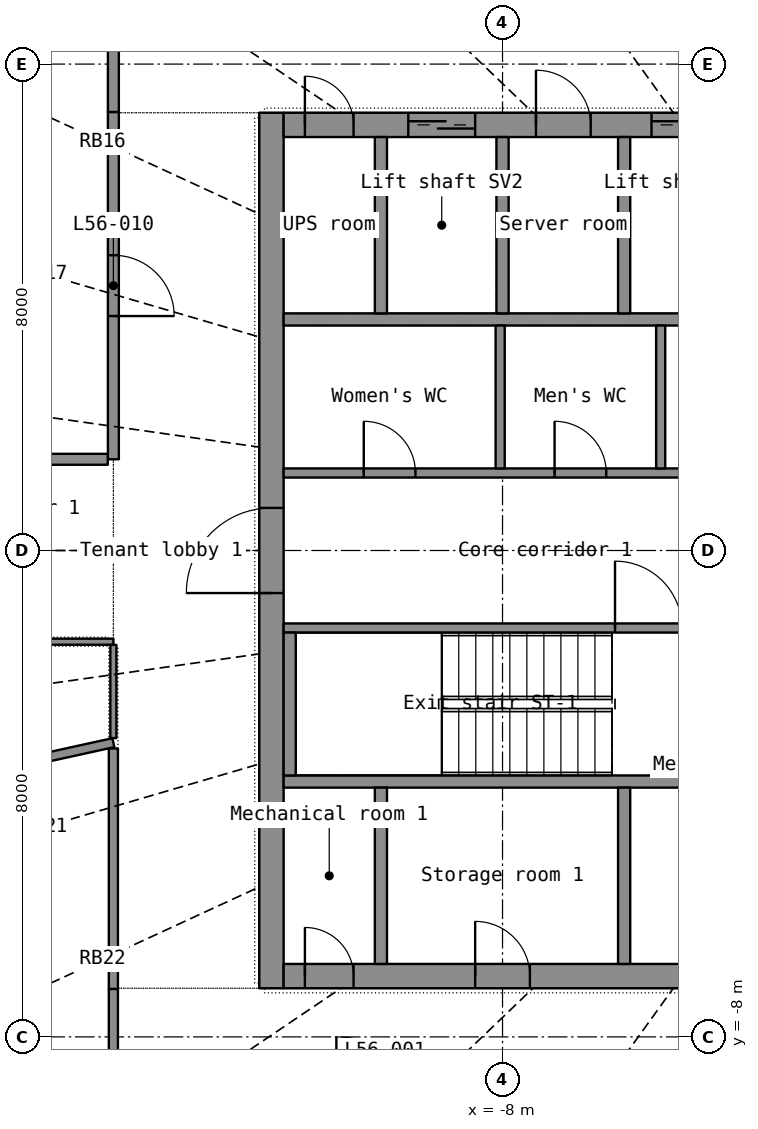
"""IFC4 building model, lengths in metres.
Left out: names, types, materials, properties, quantities, classifications, styles, units other than length and angle.
Written with IfcOpenShell. Run it as: python <this file> out.ifc"""

import sys

from ifc_helpers import new_model, si_unit, direction, frame, frame_2d, origin, place, context, subcontext, project, spatial, rectangle, extrude, element, fill, save


model = new_model("IFC4")
c1 = context("Model", 3, precision=1e-05, world=origin(), true_north=direction((0.0, 1.0)))
c2 = subcontext(c1, "Body", "Model", "MODEL_VIEW")
j1 = project(units=[si_unit("LENGTHUNIT", "METRE"), si_unit("PLANEANGLEUNIT", "RADIAN")], contexts=[c1])
p1 = place(None, origin())
s1 = spatial("IfcSite", under=j1, at=p1, CompositionType="ELEMENT")
p2 = place(p1, origin())
s2 = spatial("IfcBuilding", under=s1, at=p2, CompositionType="ELEMENT")
p3 = place(p2, frame((0.0, 0.0, 231.9)))
s3 = spatial("IfcBuildingStorey", under=s2, at=p3, CompositionType="ELEMENT", Elevation=231.9)
p4 = place(p3, frame((-11.8, -7.2, 0.0), z_axis=(0.0, 0.0, 1.0), x_axis=(0.0, 1.0, 0.0)))
e1 = element("IfcWall", 1, at=p4, inside=s3, PredefinedType="SHEAR", context=c2, shape_type="SweptSolid", body=[
    extrude(rectangle(XDim=14.4, YDim=0.4, at=frame_2d((7.2, 0.0))), origin(), (0.0, 0.0, 1.0), 3.3),
])
p5 = place(p4, frame((6.5, 0.0, 0.0)))
e2 = element("IfcOpeningElement", 2, at=p5, cuts=e1, PredefinedType="OPENING", context=c2, shape_type="SweptSolid", body=[
    extrude(rectangle(XDim=1.4, YDim=2.2, at=frame_2d((0.7, 1.1))), frame((0.0, 0.21, 0.0), z_axis=(0.0, -1.0, 0.0), x_axis=(1.0, 0.0, 0.0)), (0.0, 0.0, 1.0), 0.42),
])
p6 = place(p3, frame((-11.6, -7.0, 0.0), z_axis=(0.0, 0.0, 1.0), x_axis=(1.0, 0.0, 0.0)))
e3 = element("IfcWall", 3, at=p6, inside=s3, PredefinedType="SHEAR", context=c2, shape_type="SweptSolid", body=[
    extrude(rectangle(XDim=23.2, YDim=0.4, at=frame_2d((11.6, 0.0))), origin(), (0.0, 0.0, 1.0), 3.3),
])
p7 = place(p6, frame((20.05, 0.0, 0.0)))
e4 = element("IfcOpeningElement", 4, at=p7, cuts=e3, PredefinedType="OPENING", context=c2, shape_type="SweptSolid", body=[
    extrude(rectangle(XDim=1.1, YDim=2.2, at=frame_2d((0.55, 1.1))), frame((0.0, 0.21, 0.0), z_axis=(0.0, -1.0, 0.0), x_axis=(1.0, 0.0, 0.0)), (0.0, 0.0, 1.0), 0.42),
])
p8 = place(p6, frame((3.15, 0.0, 0.0)))
e5 = element("IfcOpeningElement", 5, at=p8, cuts=e3, PredefinedType="OPENING", context=c2, shape_type="SweptSolid", body=[
    extrude(rectangle(XDim=0.9, YDim=2.1, at=frame_2d((0.45, 1.05))), frame((0.0, 0.21, 0.0), z_axis=(0.0, -1.0, 0.0), x_axis=(1.0, 0.0, 0.0)), (0.0, 0.0, 1.0), 0.42),
])
p9 = place(p6, frame((7.15, 0.0, 0.0)))
e6 = element("IfcOpeningElement", 6, at=p9, cuts=e3, PredefinedType="OPENING", context=c2, shape_type="SweptSolid", body=[
    extrude(rectangle(XDim=0.9, YDim=2.1, at=frame_2d((0.45, 1.05))), frame((0.0, 0.21, 0.0), z_axis=(0.0, -1.0, 0.0), x_axis=(1.0, 0.0, 0.0)), (0.0, 0.0, 1.0), 0.42),
])
p10 = place(p6, frame((11.15, 0.0, 0.0)))
e7 = element("IfcOpeningElement", 7, at=p10, cuts=e3, PredefinedType="OPENING", context=c2, shape_type="SweptSolid", body=[
    extrude(rectangle(XDim=0.9, YDim=2.1, at=frame_2d((0.45, 1.05))), frame((0.0, 0.21, 0.0), z_axis=(0.0, -1.0, 0.0), x_axis=(1.0, 0.0, 0.0)), (0.0, 0.0, 1.0), 0.42),
])
p11 = place(p6, frame((16.15, 0.0, 0.0)))
e8 = element("IfcOpeningElement", 8, at=p11, cuts=e3, PredefinedType="OPENING", context=c2, shape_type="SweptSolid", body=[
    extrude(rectangle(XDim=0.9, YDim=2.1, at=frame_2d((0.45, 1.05))), frame((0.0, 0.21, 0.0), z_axis=(0.0, -1.0, 0.0), x_axis=(1.0, 0.0, 0.0)), (0.0, 0.0, 1.0), 0.42),
])
p12 = place(p6, frame((0.35, 0.0, 0.0)))
e9 = element("IfcOpeningElement", 9, at=p12, cuts=e3, PredefinedType="OPENING", context=c2, shape_type="SweptSolid", body=[
    extrude(rectangle(XDim=0.8, YDim=2.05, at=frame_2d((0.4, 1.025))), frame((0.0, 0.21, 0.0), z_axis=(0.0, -1.0, 0.0), x_axis=(1.0, 0.0, 0.0)), (0.0, 0.0, 1.0), 0.42),
])
p13 = place(p6, frame((22.05, 0.0, 0.0)))
e10 = element("IfcOpeningElement", 10, at=p13, cuts=e3, PredefinedType="OPENING", context=c2, shape_type="SweptSolid", body=[
    extrude(rectangle(XDim=0.8, YDim=2.05, at=frame_2d((0.4, 1.025))), frame((0.0, 0.21, 0.0), z_axis=(0.0, -1.0, 0.0), x_axis=(1.0, 0.0, 0.0)), (0.0, 0.0, 1.0), 0.42),
])
p14 = place(p3, frame((-11.6, 7.0, 0.0), z_axis=(0.0, 0.0, 1.0), x_axis=(1.0, 0.0, 0.0)))
e11 = element("IfcWall", 11, at=p14, inside=s3, PredefinedType="SHEAR", context=c2, shape_type="SweptSolid", body=[
    extrude(rectangle(XDim=23.2, YDim=0.4, at=frame_2d((11.6, 0.0))), origin(), (0.0, 0.0, 1.0), 3.3),
])
p15 = place(p14, frame((2.05, 0.0, 0.0)))
e12 = element("IfcOpeningElement", 12, at=p15, cuts=e11, PredefinedType="OPENING", context=c2, shape_type="SweptSolid", body=[
    extrude(rectangle(XDim=1.1, YDim=2.2, at=frame_2d((0.55, 1.1))), frame((0.0, 0.21, 0.0), z_axis=(0.0, -1.0, 0.0), x_axis=(1.0, 0.0, 0.0)), (0.0, 0.0, 1.0), 0.42),
])
p16 = place(p14, frame((6.05, 0.0, 0.0)))
e13 = element("IfcOpeningElement", 13, at=p16, cuts=e11, PredefinedType="OPENING", context=c2, shape_type="SweptSolid", body=[
    extrude(rectangle(XDim=1.1, YDim=2.2, at=frame_2d((0.55, 1.1))), frame((0.0, 0.21, 0.0), z_axis=(0.0, -1.0, 0.0), x_axis=(1.0, 0.0, 0.0)), (0.0, 0.0, 1.0), 0.42),
])
p17 = place(p14, frame((8.05, 0.0, 0.0)))
e14 = element("IfcOpeningElement", 14, at=p17, cuts=e11, PredefinedType="OPENING", context=c2, shape_type="SweptSolid", body=[
    extrude(rectangle(XDim=1.1, YDim=2.2, at=frame_2d((0.55, 1.1))), frame((0.0, 0.21, 0.0), z_axis=(0.0, -1.0, 0.0), x_axis=(1.0, 0.0, 0.0)), (0.0, 0.0, 1.0), 0.42),
])
p18 = place(p14, frame((10.05, 0.0, 0.0)))
e15 = element("IfcOpeningElement", 15, at=p18, cuts=e11, PredefinedType="OPENING", context=c2, shape_type="SweptSolid", body=[
    extrude(rectangle(XDim=1.1, YDim=2.2, at=frame_2d((0.55, 1.1))), frame((0.0, 0.21, 0.0), z_axis=(0.0, -1.0, 0.0), x_axis=(1.0, 0.0, 0.0)), (0.0, 0.0, 1.0), 0.42),
])
p19 = place(p14, frame((12.05, 0.0, 0.0)))
e16 = element("IfcOpeningElement", 16, at=p19, cuts=e11, PredefinedType="OPENING", context=c2, shape_type="SweptSolid", body=[
    extrude(rectangle(XDim=1.1, YDim=2.2, at=frame_2d((0.55, 1.1))), frame((0.0, 0.21, 0.0), z_axis=(0.0, -1.0, 0.0), x_axis=(1.0, 0.0, 0.0)), (0.0, 0.0, 1.0), 0.42),
])
p20 = place(p14, frame((14.05, 0.0, 0.0)))
e17 = element("IfcOpeningElement", 17, at=p20, cuts=e11, PredefinedType="OPENING", context=c2, shape_type="SweptSolid", body=[
    extrude(rectangle(XDim=1.1, YDim=2.2, at=frame_2d((0.55, 1.1))), frame((0.0, 0.21, 0.0), z_axis=(0.0, -1.0, 0.0), x_axis=(1.0, 0.0, 0.0)), (0.0, 0.0, 1.0), 0.42),
])
p21 = place(p14, frame((16.05, 0.0, 0.0)))
e18 = element("IfcOpeningElement", 18, at=p21, cuts=e11, PredefinedType="OPENING", context=c2, shape_type="SweptSolid", body=[
    extrude(rectangle(XDim=1.1, YDim=2.2, at=frame_2d((0.55, 1.1))), frame((0.0, 0.21, 0.0), z_axis=(0.0, -1.0, 0.0), x_axis=(1.0, 0.0, 0.0)), (0.0, 0.0, 1.0), 0.42),
])
p22 = place(p14, frame((18.05, 0.0, 0.0)))
e19 = element("IfcOpeningElement", 19, at=p22, cuts=e11, PredefinedType="OPENING", context=c2, shape_type="SweptSolid", body=[
    extrude(rectangle(XDim=1.1, YDim=2.2, at=frame_2d((0.55, 1.1))), frame((0.0, 0.21, 0.0), z_axis=(0.0, -1.0, 0.0), x_axis=(1.0, 0.0, 0.0)), (0.0, 0.0, 1.0), 0.42),
])
p23 = place(p14, frame((20.05, 0.0, 0.0)))
e20 = element("IfcOpeningElement", 20, at=p23, cuts=e11, PredefinedType="OPENING", context=c2, shape_type="SweptSolid", body=[
    extrude(rectangle(XDim=1.1, YDim=2.2, at=frame_2d((0.55, 1.1))), frame((0.0, 0.21, 0.0), z_axis=(0.0, -1.0, 0.0), x_axis=(1.0, 0.0, 0.0)), (0.0, 0.0, 1.0), 0.42),
])
p24 = place(p14, frame((4.15, 0.0, 0.0)))
e21 = element("IfcOpeningElement", 21, at=p24, cuts=e11, PredefinedType="OPENING", context=c2, shape_type="SweptSolid", body=[
    extrude(rectangle(XDim=0.9, YDim=2.1, at=frame_2d((0.45, 1.05))), frame((0.0, 0.21, 0.0), z_axis=(0.0, -1.0, 0.0), x_axis=(1.0, 0.0, 0.0)), (0.0, 0.0, 1.0), 0.42),
])
p25 = place(p14, frame((0.35, 0.0, 0.0)))
e22 = element("IfcOpeningElement", 22, at=p25, cuts=e11, PredefinedType="OPENING", context=c2, shape_type="SweptSolid", body=[
    extrude(rectangle(XDim=0.8, YDim=2.05, at=frame_2d((0.4, 1.025))), frame((0.0, 0.21, 0.0), z_axis=(0.0, -1.0, 0.0), x_axis=(1.0, 0.0, 0.0)), (0.0, 0.0, 1.0), 0.42),
])
p26 = place(p14, frame((22.05, 0.0, 0.0)))
e23 = element("IfcOpeningElement", 23, at=p26, cuts=e11, PredefinedType="OPENING", context=c2, shape_type="SweptSolid", body=[
    extrude(rectangle(XDim=0.8, YDim=2.05, at=frame_2d((0.4, 1.025))), frame((0.0, 0.21, 0.0), z_axis=(0.0, -1.0, 0.0), x_axis=(1.0, 0.0, 0.0)), (0.0, 0.0, 1.0), 0.42),
])
for number, where, z_axis, x_axis in (
    (24, (-11.6, -3.8, 0.0), (0.0, 0.0, 1.0), (1.0, 0.0, 0.0)),
    (25, (-11.6, 3.8, 0.0), (0.0, 0.0, 1.0), (1.0, 0.0, 0.0)),
):
    element("IfcWall", number, at=place(p3, frame(where, z_axis=z_axis, x_axis=x_axis)), inside=s3, PredefinedType="SHEAR", context=c2, shape_type="SweptSolid", body=[
        extrude(rectangle(XDim=23.2, YDim=0.2, at=frame_2d((11.6, 0.0))), origin(), (0.0, 0.0, 1.0), 3.3),
    ])
p27 = place(p3, frame((-10.0, -6.8, 0.0), z_axis=(0.0, 0.0, 1.0), x_axis=(0.0, 1.0, 0.0)))
e26 = element("IfcWall", 26, at=p27, inside=s3, PredefinedType="SHEAR", context=c2, shape_type="SweptSolid", body=[
    extrude(rectangle(XDim=2.9, YDim=0.2, at=frame_2d((1.45, 0.0))), origin(), (0.0, 0.0, 1.0), 3.3),
])
p28 = place(p3, frame((-6.0, -6.8, 0.0), z_axis=(0.0, 0.0, 1.0), x_axis=(0.0, 1.0, 0.0)))
e27 = element("IfcWall", 27, at=p28, inside=s3, PredefinedType="PARTITIONING", context=c2, shape_type="SweptSolid", body=[
    extrude(rectangle(XDim=2.9, YDim=0.2, at=frame_2d((1.45, 0.0))), origin(), (0.0, 0.0, 1.0), 3.3),
])
for number, where, z_axis, x_axis in (
    (28, (-10.0, 3.9, 0.0), (0.0, 0.0, 1.0), (0.0, 1.0, 0.0)),
    (29, (-8.0, 3.9, 0.0), (0.0, 0.0, 1.0), (0.0, 1.0, 0.0)),
    (30, (-6.0, 3.9, 0.0), (0.0, 0.0, 1.0), (0.0, 1.0, 0.0)),
):
    element("IfcWall", number, at=place(p3, frame(where, z_axis=z_axis, x_axis=x_axis)), inside=s3, PredefinedType="SHEAR", context=c2, shape_type="SweptSolid", body=[
        extrude(rectangle(XDim=2.9, YDim=0.2, at=frame_2d((1.45, 0.0))), origin(), (0.0, 0.0, 1.0), 3.3),
    ])
p29 = place(p3, frame((-11.6, -1.275, 0.0), z_axis=(0.0, 0.0, 1.0), x_axis=(1.0, 0.0, 0.0)))
e31 = element("IfcWall", 31, at=p29, inside=s3, PredefinedType="SHEAR", context=c2, shape_type="SweptSolid", body=[
    extrude(rectangle(XDim=8.6, YDim=0.15, at=frame_2d((4.3, 0.0))), origin(), (0.0, 0.0, 1.0), 3.3),
])
p30 = place(p29, frame((5.45, 0.0, 0.0)))
e32 = element("IfcOpeningElement", 32, at=p30, cuts=e31, PredefinedType="OPENING", context=c2, shape_type="SweptSolid", body=[
    extrude(rectangle(XDim=1.1, YDim=2.15, at=frame_2d((0.55, 1.075))), frame((0.0, 0.085, 0.0), z_axis=(0.0, -1.0, 0.0), x_axis=(1.0, 0.0, 0.0)), (0.0, 0.0, 1.0), 0.17),
])
p31 = place(p29, frame((7.25, 0.0, 0.0)))
e33 = element("IfcOpeningElement", 33, at=p31, cuts=e31, PredefinedType="OPENING", context=c2, shape_type="SweptSolid", body=[
    extrude(rectangle(XDim=0.9, YDim=2.1, at=frame_2d((0.45, 1.05))), frame((0.0, 0.085, 0.0), z_axis=(0.0, -1.0, 0.0), x_axis=(1.0, 0.0, 0.0)), (0.0, 0.0, 1.0), 0.17),
])
p32 = place(p3, frame((-11.6, 1.275, 0.0), z_axis=(0.0, 0.0, 1.0), x_axis=(1.0, 0.0, 0.0)))
e34 = element("IfcWall", 34, at=p32, inside=s3, PredefinedType="PARTITIONING", context=c2, shape_type="SweptSolid", body=[
    extrude(rectangle(XDim=8.6, YDim=0.15, at=frame_2d((4.3, 0.0))), origin(), (0.0, 0.0, 1.0), 3.3),
])
p33 = place(p32, frame((1.318, 0.0, 0.0)))
e35 = element("IfcOpeningElement", 35, at=p33, cuts=e34, PredefinedType="OPENING", context=c2, shape_type="SweptSolid", body=[
    extrude(rectangle(XDim=0.85, YDim=2.1, at=frame_2d((0.425, 1.05))), frame((0.0, 0.085, 0.0), z_axis=(0.0, -1.0, 0.0), x_axis=(1.0, 0.0, 0.0)), (0.0, 0.0, 1.0), 0.17),
])
p34 = place(p32, frame((4.456, 0.0, 0.0)))
e36 = element("IfcOpeningElement", 36, at=p34, cuts=e34, PredefinedType="OPENING", context=c2, shape_type="SweptSolid", body=[
    extrude(rectangle(XDim=0.85, YDim=2.1, at=frame_2d((0.425, 1.05))), frame((0.0, 0.085, 0.0), z_axis=(0.0, -1.0, 0.0), x_axis=(1.0, 0.0, 0.0)), (0.0, 0.0, 1.0), 0.17),
])
p35 = place(p32, frame((6.988, 0.0, 0.0)))
e37 = element("IfcOpeningElement", 37, at=p35, cuts=e34, PredefinedType="OPENING", context=c2, shape_type="SweptSolid", body=[
    extrude(rectangle(XDim=0.9, YDim=2.1, at=frame_2d((0.45, 1.05))), frame((0.0, 0.085, 0.0), z_axis=(0.0, -1.0, 0.0), x_axis=(1.0, 0.0, 0.0)), (0.0, 0.0, 1.0), 0.17),
])
p36 = place(p3, frame((-11.5, -3.7, 0.0), z_axis=(0.0, 0.0, 1.0), x_axis=(0.0, 1.0, 0.0)))
e38 = element("IfcWall", 38, at=p36, inside=s3, PredefinedType="SHEAR", context=c2, shape_type="SweptSolid", body=[
    extrude(rectangle(XDim=2.35, YDim=0.2, at=frame_2d((1.175, 0.0))), origin(), (0.0, 0.0, 1.0), 3.3),
])
for number, where, z_axis, x_axis in (
    (39, (-8.039, 1.35, 0.0), (0.0, 0.0, 1.0), (0.0, 1.0, 0.0)),
    (40, (-5.399, 1.35, 0.0), (0.0, 0.0, 1.0), (0.0, 1.0, 0.0)),
):
    element("IfcWall", number, at=place(p3, frame(where, z_axis=z_axis, x_axis=x_axis)), inside=s3, PredefinedType="PARTITIONING", context=c2, shape_type="SweptSolid", body=[
        extrude(rectangle(XDim=2.35, YDim=0.15, at=frame_2d((1.175, 0.0))), origin(), (0.0, 0.0, 1.0), 3.3),
    ])
p37 = place(p3, frame((-14.4, -3.161, 0.0), z_axis=(0.0, 0.0, 1.0), x_axis=(-0.976754355, -0.214361681, 0.0)))
e41 = element("IfcWall", 41, at=p37, inside=s3, PredefinedType="PARTITIONING", context=c2, shape_type="SweptSolid", body=[
    extrude(rectangle(XDim=6.352, YDim=0.15, at=frame_2d((3.176, 0.0))), origin(), (0.0, 0.0, 1.0), 2.4),
])
p38 = place(p3, frame((-14.4, 7.212, 0.0), z_axis=(0.0, 0.0, 1.0), x_axis=(0.0, -1.0, 0.0)))
e42 = element("IfcWall", 42, at=p38, inside=s3, PredefinedType="PARTITIONING", context=c2, shape_type="SweptSolid", body=[
    extrude(rectangle(XDim=5.712, YDim=0.18, at=frame_2d((2.856, 0.0))), origin(), (0.0, 0.0, 1.0), 2.4),
])
p39 = place(p38, frame((2.356, 0.0, 0.0)))
e43 = element("IfcOpeningElement", 43, at=p39, cuts=e42, PredefinedType="OPENING", context=c2, shape_type="SweptSolid", body=[
    extrude(rectangle(XDim=1.0, YDim=2.1, at=frame_2d((0.5, 1.05))), frame((0.0, 0.1, 0.0), z_axis=(0.0, -1.0, 0.0), x_axis=(1.0, 0.0, 0.0)), (0.0, 0.0, 1.0), 0.2),
])
p40 = place(p3, frame((-18.722, -1.5, 0.0), z_axis=(0.0, 0.0, 1.0), x_axis=(1.0, 0.0, 0.0)))
e44 = element("IfcWall", 44, at=p40, inside=s3, PredefinedType="PARTITIONING", context=c2, shape_type="SweptSolid", body=[
    extrude(rectangle(XDim=4.322, YDim=0.1, at=frame_2d((2.161, 0.0))), origin(), (0.0, 0.0, 1.0), 2.4),
])
p41 = place(p40, frame((1.686, 0.0, 0.0)))
e45 = element("IfcOpeningElement", 45, at=p41, cuts=e44, PredefinedType="OPENING", context=c2, shape_type="SweptSolid", body=[
    extrude(rectangle(XDim=0.95, YDim=2.15, at=frame_2d((0.475, 1.075))), frame((0.0, 0.06, 0.0), z_axis=(0.0, -1.0, 0.0), x_axis=(1.0, 0.0, 0.0)), (0.0, 0.0, 1.0), 0.12),
])
p42 = place(p3, frame((-14.492, 1.5, 0.0), z_axis=(0.0, 0.0, 1.0), x_axis=(-1.0, 0.0, 0.0)))
e46 = element("IfcWall", 46, at=p42, inside=s3, PredefinedType="PARTITIONING", context=c2, shape_type="SweptSolid", body=[
    extrude(rectangle(XDim=4.23, YDim=0.18, at=frame_2d((2.115, 0.0))), origin(), (0.0, 0.0, 1.0), 2.4),
])
p43 = place(p3, frame((-14.4, -3.256, 0.0), z_axis=(0.0, 0.0, 1.0), x_axis=(0.0, -1.0, 0.0)))
e47 = element("IfcWall", 47, at=p43, inside=s3, PredefinedType="PARTITIONING", context=c2, shape_type="SweptSolid", body=[
    extrude(rectangle(XDim=3.956, YDim=0.15, at=frame_2d((1.978, 0.0))), origin(), (0.0, 0.0, 1.0), 2.4),
])
p44 = place(p3, frame((-14.4, -7.213, 0.0), z_axis=(0.0, 0.0, 1.0), x_axis=(0.0, -1.0, 0.0)))
e48 = element("IfcWall", 48, at=p44, inside=s3, PredefinedType="PARTITIONING", context=c2, shape_type="SweptSolid", body=[
    extrude(rectangle(XDim=2.31, YDim=0.15, at=frame_2d((1.155, 0.0))), origin(), (0.0, 0.0, 1.0), 2.4),
])
p45 = place(p3, frame((-14.4, 9.508, 0.0), z_axis=(0.0, 0.0, 1.0), x_axis=(0.0, -1.0, 0.0)))
e49 = element("IfcWall", 49, at=p45, inside=s3, PredefinedType="PARTITIONING", context=c2, shape_type="SweptSolid", body=[
    extrude(rectangle(XDim=2.295, YDim=0.18, at=frame_2d((1.147, 0.0))), origin(), (0.0, 0.0, 1.0), 2.4),
])
p46 = place(p3, frame((-14.4, -1.552, 0.0), z_axis=(0.0, 0.0, 1.0), x_axis=(0.0, -1.0, 0.0)))
e50 = element("IfcWall", 50, at=p46, inside=s3, PredefinedType="PARTITIONING", context=c2, shape_type="SweptSolid", body=[
    extrude(rectangle(XDim=1.533, YDim=0.1, at=frame_2d((0.767, 0.0))), origin(), (0.0, 0.0, 1.0), 2.4),
])
p47 = place(p8, origin())
e51 = element("IfcDoor", 51, at=p47, inside=s3, OperationType="SINGLE_SWING_LEFT", PredefinedType="DOOR", context=c2, shape_type="SweptSolid", body=[
    extrude(rectangle(XDim=0.9, YDim=2.1, at=frame_2d((0.45, 1.05))), frame((0.0, 0.025, 0.0), z_axis=(0.0, -1.0, 0.0), x_axis=(1.0, 0.0, 0.0)), (0.0, 0.0, 1.0), 0.05),
])
fill(e5, e51)
p48 = place(p12, origin())
e52 = element("IfcDoor", 52, at=p48, inside=s3, OperationType="SINGLE_SWING_LEFT", PredefinedType="DOOR", context=c2, shape_type="SweptSolid", body=[
    extrude(rectangle(XDim=0.8, YDim=2.05, at=frame_2d((0.4, 1.025))), frame((0.0, 0.025, 0.0), z_axis=(0.0, -1.0, 0.0), x_axis=(1.0, 0.0, 0.0)), (0.0, 0.0, 1.0), 0.05),
])
fill(e9, e52)
p49 = place(p15, origin())
e53 = element("IfcDoor", 53, at=p49, inside=s3, OperationType="DOUBLE_DOOR_SLIDING", PredefinedType="DOOR", context=c2, shape_type="SweptSolid", body=[
    extrude(rectangle(XDim=1.1, YDim=2.2, at=frame_2d((0.55, 1.1))), frame((0.0, 0.025, 0.0), z_axis=(0.0, -1.0, 0.0), x_axis=(1.0, 0.0, 0.0)), (0.0, 0.0, 1.0), 0.05),
])
fill(e12, e53)
p50 = place(p16, origin())
e54 = element("IfcDoor", 54, at=p50, inside=s3, OperationType="DOUBLE_DOOR_SLIDING", PredefinedType="DOOR", context=c2, shape_type="SweptSolid", body=[
    extrude(rectangle(XDim=1.1, YDim=2.2, at=frame_2d((0.55, 1.1))), frame((0.0, 0.025, 0.0), z_axis=(0.0, -1.0, 0.0), x_axis=(1.0, 0.0, 0.0)), (0.0, 0.0, 1.0), 0.05),
])
fill(e13, e54)
p51 = place(p24, origin())
e55 = element("IfcDoor", 55, at=p51, inside=s3, OperationType="SINGLE_SWING_LEFT", PredefinedType="DOOR", context=c2, shape_type="SweptSolid", body=[
    extrude(rectangle(XDim=0.9, YDim=2.1, at=frame_2d((0.45, 1.05))), frame((0.0, 0.025, 0.0), z_axis=(0.0, -1.0, 0.0), x_axis=(1.0, 0.0, 0.0)), (0.0, 0.0, 1.0), 0.05),
])
fill(e21, e55)
p52 = place(p25, origin())
e56 = element("IfcDoor", 56, at=p52, inside=s3, OperationType="SINGLE_SWING_LEFT", PredefinedType="DOOR", context=c2, shape_type="SweptSolid", body=[
    extrude(rectangle(XDim=0.8, YDim=2.05, at=frame_2d((0.4, 1.025))), frame((0.0, 0.025, 0.0), z_axis=(0.0, -1.0, 0.0), x_axis=(1.0, 0.0, 0.0)), (0.0, 0.0, 1.0), 0.05),
])
fill(e22, e56)
p53 = place(p5, origin())
e57 = element("IfcDoor", 57, at=p53, inside=s3, OperationType="DOUBLE_DOOR_SINGLE_SWING", PredefinedType="DOOR", context=c2, shape_type="SweptSolid", body=[
    extrude(rectangle(XDim=1.4, YDim=2.2, at=frame_2d((0.7, 1.1))), frame((0.0, 0.025, 0.0), z_axis=(0.0, -1.0, 0.0), x_axis=(1.0, 0.0, 0.0)), (0.0, 0.0, 1.0), 0.05),
])
fill(e2, e57)
p54 = place(p30, origin())
e58 = element("IfcDoor", 58, at=p54, inside=s3, OperationType="SINGLE_SWING_LEFT", PredefinedType="DOOR", context=c2, shape_type="SweptSolid", body=[
    extrude(rectangle(XDim=1.1, YDim=2.15, at=frame_2d((0.55, 1.075))), frame((0.0, 0.025, 0.0), z_axis=(0.0, -1.0, 0.0), x_axis=(1.0, 0.0, 0.0)), (0.0, 0.0, 1.0), 0.05),
])
fill(e32, e58)
p55 = place(p33, origin())
e59 = element("IfcDoor", 59, at=p55, inside=s3, OperationType="SINGLE_SWING_LEFT", PredefinedType="DOOR", context=c2, shape_type="SweptSolid", body=[
    extrude(rectangle(XDim=0.85, YDim=2.1, at=frame_2d((0.425, 1.05))), frame((0.0, 0.025, 0.0), z_axis=(0.0, -1.0, 0.0), x_axis=(1.0, 0.0, 0.0)), (0.0, 0.0, 1.0), 0.05),
])
fill(e35, e59)
p56 = place(p34, origin())
e60 = element("IfcDoor", 60, at=p56, inside=s3, OperationType="SINGLE_SWING_LEFT", PredefinedType="DOOR", context=c2, shape_type="SweptSolid", body=[
    extrude(rectangle(XDim=0.85, YDim=2.1, at=frame_2d((0.425, 1.05))), frame((0.0, 0.025, 0.0), z_axis=(0.0, -1.0, 0.0), x_axis=(1.0, 0.0, 0.0)), (0.0, 0.0, 1.0), 0.05),
])
fill(e36, e60)
p57 = place(p39, origin())
e61 = element("IfcDoor", 61, at=p57, inside=s3, OperationType="SINGLE_SWING_RIGHT", PredefinedType="DOOR", context=c2, shape_type="SweptSolid", body=[
    extrude(rectangle(XDim=1.0, YDim=2.1, at=frame_2d((0.5, 1.05))), frame((0.0, 0.025, 0.0), z_axis=(0.0, -1.0, 0.0), x_axis=(1.0, 0.0, 0.0)), (0.0, 0.0, 1.0), 0.05),
])
fill(e43, e61)
save(model, sys.argv[1])
